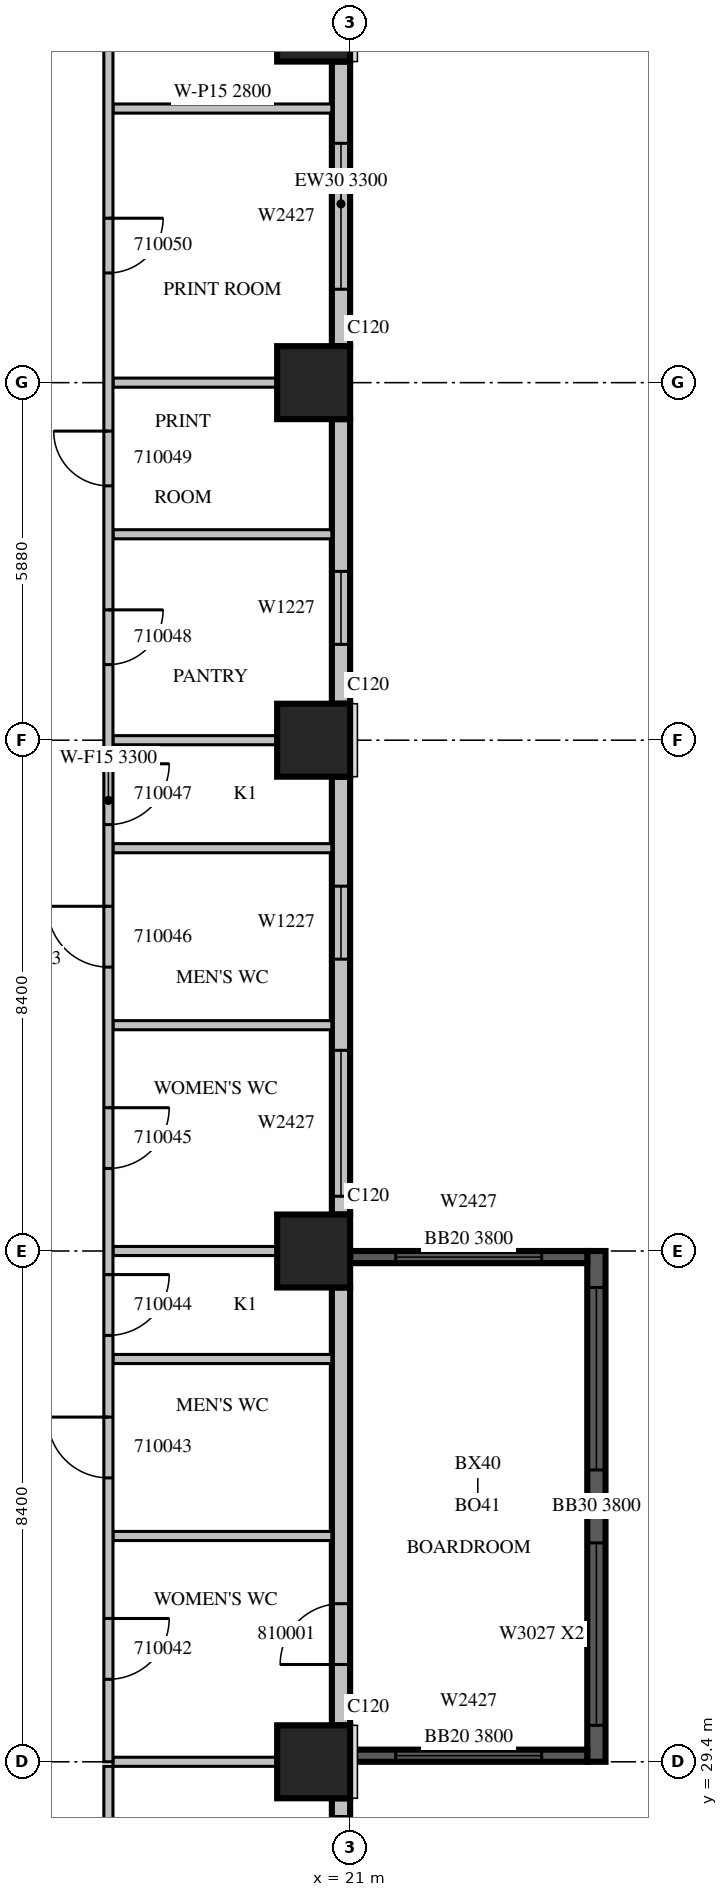
"""IFC4 building model, lengths in metres.
Left out: names, types, materials, properties, quantities, classifications, styles, units other than length and angle.
Written with IfcOpenShell. Run it as: python <this file> out.ifc"""

import sys

from ifc_helpers import new_model, si_unit, direction, frame, frame_2d, origin, origin_2d, place, context, subcontext, project, spatial, rectangle, extrude, source, transform, mapped, element, fill, save


model = new_model("IFC4")
c1 = context("Model", 3, precision=1e-05, world=origin(), true_north=direction((0.0, 1.0)))
c2 = subcontext(c1, "Body", "Model", "MODEL_VIEW")
j1 = project(units=[si_unit("LENGTHUNIT", "METRE"), si_unit("PLANEANGLEUNIT", "RADIAN")], contexts=[c1])
p1 = place(None, origin())
s1 = spatial("IfcSite", under=j1, at=p1, CompositionType="ELEMENT")
p2 = place(p1, origin())
s2 = spatial("IfcBuilding", under=s1, at=p2, CompositionType="ELEMENT")
p3 = place(p2, frame((0.0, 0.0, 53.1)))
s3 = spatial("IfcBuildingStorey", under=s2, at=p3, CompositionType="ELEMENT", Elevation=53.1)
m1 = source(origin(), c2, "Body", "SweptSolid", [
    extrude(rectangle(XDim=1.2, YDim=1.2, at=origin_2d()), origin(), (0.0, 0.0, 1.0), 4.2),
])
for number, where, z_axis, x_axis in (
    (1, (20.4, 29.4, 0.0), (0.0, 0.0, 1.0), (1.0, 0.0, 0.0)),
    (2, (20.4, 37.8, 0.0), (0.0, 0.0, 1.0), (1.0, 0.0, 0.0)),
    (3, (20.4, 46.2, 0.0), (0.0, 0.0, 1.0), (1.0, 0.0, 0.0)),
    (4, (20.4, 52.08, 0.0), (0.0, 0.0, 1.0), (1.0, 0.0, 0.0)),
    (5, (20.4, 57.96, 0.0), (0.0, 0.0, 1.0), (1.0, 0.0, 0.0)),
):
    element("IfcColumn", number, at=place(p3, frame(where, z_axis=z_axis, x_axis=x_axis)), inside=s3, PredefinedType="COLUMN", context=c2, shape_type="MappedRepresentation", body=[
        mapped(m1, transform((0.0, 0.0, 0.0), scale=1.0)),
    ])
p4 = place(p3, frame((25.05, 29.4, 0.0), z_axis=(0.0, 0.0, 1.0), x_axis=(0.0, 1.0, 0.0)))
e6 = element("IfcWall", 6, at=p4, inside=s3, PredefinedType="SOLIDWALL", context=c2, shape_type="SweptSolid", body=[
    extrude(rectangle(XDim=8.4, YDim=0.3, at=frame_2d((4.2, 0.0))), origin(), (0.0, 0.0, 1.0), 3.8),
])
m2 = source(origin(), c2, "Body", "SweptSolid", [
    extrude(rectangle(XDim=3.0, YDim=2.7, at=frame_2d((1.5, 1.35))), frame((0.0, 0.16, 0.0), z_axis=(0.0, -1.0, 0.0), x_axis=(1.0, 0.0, 0.0)), (0.0, 0.0, 1.0), 0.32),
])
p5 = place(p4, frame((0.6, 0.0, 0.6)))
e7 = element("IfcOpeningElement", 7, at=p5, cuts=e6, PredefinedType="OPENING", context=c2, shape_type="MappedRepresentation", body=[
    mapped(m2, transform((0.0, 0.0, 0.0), scale=1.0)),
])
p6 = place(p4, frame((4.8, 0.0, 0.6)))
e8 = element("IfcOpeningElement", 8, at=p6, cuts=e6, PredefinedType="OPENING", context=c2, shape_type="MappedRepresentation", body=[
    mapped(m2, transform((0.0, 0.0, 0.0), scale=1.0)),
])
m3 = source(origin(), c2, "Body", "SweptSolid", [
    extrude(rectangle(XDim=3.9, YDim=0.2, at=frame_2d((1.95, 0.0))), origin(), (0.0, 0.0, 1.0), 3.8),
])
p7 = place(p3, frame((21.0, 29.5, 0.0), z_axis=(0.0, 0.0, 1.0), x_axis=(1.0, 0.0, 0.0)))
e9 = element("IfcWall", 9, at=p7, inside=s3, PredefinedType="SOLIDWALL", context=c2, shape_type="MappedRepresentation", body=[
    mapped(m3, transform((0.0, 0.0, 0.0), scale=1.0)),
])
m4 = source(origin(), c2, "Body", "SweptSolid", [
    extrude(rectangle(XDim=2.4, YDim=2.7, at=frame_2d((1.2, 1.35))), frame((0.0, 0.11, 0.0), z_axis=(0.0, -1.0, 0.0), x_axis=(1.0, 0.0, 0.0)), (0.0, 0.0, 1.0), 0.22),
])
p8 = place(p7, frame((0.75, 0.0, 0.6)))
e10 = element("IfcOpeningElement", 10, at=p8, cuts=e9, PredefinedType="OPENING", context=c2, shape_type="MappedRepresentation", body=[
    mapped(m4, transform((0.0, 0.0, 0.0), scale=1.0)),
])
p9 = place(p3, frame((21.0, 37.7, 0.0), z_axis=(0.0, 0.0, 1.0), x_axis=(1.0, 0.0, 0.0)))
e11 = element("IfcWall", 11, at=p9, inside=s3, PredefinedType="SOLIDWALL", context=c2, shape_type="MappedRepresentation", body=[
    mapped(m3, transform((0.0, 0.0, 0.0), scale=1.0)),
])
p10 = place(p9, frame((0.75, 0.0, 0.6)))
e12 = element("IfcOpeningElement", 12, at=p10, cuts=e11, PredefinedType="OPENING", context=c2, shape_type="MappedRepresentation", body=[
    mapped(m4, transform((0.0, 0.0, 0.0), scale=1.0)),
])
m5 = source(origin(), c2, "Body", "SweptSolid", [
    extrude(rectangle(XDim=6.6, YDim=0.3, at=frame_2d((3.3, 0.0))), origin(), (0.0, 0.0, 1.0), 3.8),
])
p11 = place(p3, frame((20.85, 22.2, 0.0), z_axis=(0.0, 0.0, 1.0), x_axis=(0.0, 1.0, 0.0)))
e13 = element("IfcWall", 13, at=p11, inside=s3, PredefinedType="STANDARD", context=c2, shape_type="MappedRepresentation", body=[
    mapped(m5, transform((0.0, 0.0, 0.0), scale=1.0)),
])
m6 = source(origin(), c2, "Body", "SweptSolid", [
    extrude(rectangle(XDim=1.2, YDim=2.7, at=frame_2d((0.6, 1.35))), frame((0.0, 0.16, 0.0), z_axis=(0.0, -1.0, 0.0), x_axis=(1.0, 0.0, 0.0)), (0.0, 0.0, 1.0), 0.32),
])
p12 = place(p11, frame((0.3, 0.0, 0.6)))
e14 = element("IfcOpeningElement", 14, at=p12, cuts=e13, PredefinedType="OPENING", context=c2, shape_type="MappedRepresentation", body=[
    mapped(m6, transform((0.0, 0.0, 0.0), scale=1.0)),
])
m7 = source(origin(), c2, "Body", "SweptSolid", [
    extrude(rectangle(XDim=2.4, YDim=2.7, at=frame_2d((1.2, 1.35))), frame((0.0, 0.16, 0.0), z_axis=(0.0, -1.0, 0.0), x_axis=(1.0, 0.0, 0.0)), (0.0, 0.0, 1.0), 0.32),
])
p13 = place(p11, frame((3.9, 0.0, 0.6)))
e15 = element("IfcOpeningElement", 15, at=p13, cuts=e13, PredefinedType="OPENING", context=c2, shape_type="MappedRepresentation", body=[
    mapped(m7, transform((0.0, 0.0, 0.0), scale=1.0)),
])
m8 = source(origin(), c2, "Body", "SweptSolid", [
    extrude(rectangle(XDim=7.2, YDim=0.3, at=frame_2d((3.6, 0.0))), origin(), (0.0, 0.0, 1.0), 3.8),
])
p14 = place(p3, frame((20.85, 30.0, 0.0), z_axis=(0.0, 0.0, 1.0), x_axis=(0.0, 1.0, 0.0)))
e16 = element("IfcWall", 16, at=p14, inside=s3, PredefinedType="STANDARD", context=c2, shape_type="MappedRepresentation", body=[
    mapped(m8, transform((0.0, 0.0, 0.0), scale=1.0)),
])
m9 = source(origin(), c2, "Body", "SweptSolid", [
    extrude(rectangle(XDim=1.0, YDim=2.1, at=frame_2d((0.5, 1.05))), frame((0.0, 0.16, 0.0), z_axis=(0.0, -1.0, 0.0), x_axis=(1.0, 0.0, 0.0)), (0.0, 0.0, 1.0), 0.32),
])
p15 = place(p14, frame((1.0, 0.0, 0.0)))
e17 = element("IfcOpeningElement", 17, at=p15, cuts=e16, PredefinedType="OPENING", context=c2, shape_type="MappedRepresentation", body=[
    mapped(m9, transform((0.0, 0.0, 0.0), scale=1.0)),
])
p16 = place(p3, frame((20.85, 38.4, 0.0), z_axis=(0.0, 0.0, 1.0), x_axis=(0.0, 1.0, 0.0)))
e18 = element("IfcWall", 18, at=p16, inside=s3, PredefinedType="STANDARD", context=c2, shape_type="MappedRepresentation", body=[
    mapped(m8, transform((0.0, 0.0, 0.0), scale=1.0)),
])
p17 = place(p16, frame((0.3, 0.0, 0.6)))
e19 = element("IfcOpeningElement", 19, at=p17, cuts=e18, PredefinedType="OPENING", context=c2, shape_type="MappedRepresentation", body=[
    mapped(m7, transform((0.0, 0.0, 0.0), scale=1.0)),
])
p18 = place(p16, frame((4.199, 0.0, 0.6)))
e20 = element("IfcOpeningElement", 20, at=p18, cuts=e18, PredefinedType="OPENING", context=c2, shape_type="MappedRepresentation", body=[
    mapped(m6, transform((0.0, 0.0, 0.0), scale=1.0)),
])
m10 = source(origin(), c2, "Body", "SweptSolid", [
    extrude(rectangle(XDim=4.68, YDim=0.3, at=frame_2d((2.34, 0.0))), origin(), (0.0, 0.0, 1.0), 3.8),
])
p19 = place(p3, frame((20.85, 46.8, 0.0), z_axis=(0.0, 0.0, 1.0), x_axis=(0.0, 1.0, 0.0)))
e21 = element("IfcWall", 21, at=p19, inside=s3, PredefinedType="STANDARD", context=c2, shape_type="MappedRepresentation", body=[
    mapped(m10, transform((0.0, 0.0, 0.0), scale=1.0)),
])
p20 = place(p19, frame((0.976, 0.0, 0.6)))
e22 = element("IfcOpeningElement", 22, at=p20, cuts=e21, PredefinedType="OPENING", context=c2, shape_type="MappedRepresentation", body=[
    mapped(m6, transform((0.0, 0.0, 0.0), scale=1.0)),
])
m11 = source(origin(), c2, "Body", "SweptSolid", [
    extrude(rectangle(XDim=4.68, YDim=0.3, at=frame_2d((2.34, 0.0))), origin(), (0.0, 0.0, 1.0), 3.3),
])
p21 = place(p3, frame((20.85, 52.68, 0.0), z_axis=(0.0, 0.0, 1.0), x_axis=(0.0, 1.0, 0.0)))
e23 = element("IfcWall", 23, at=p21, inside=s3, PredefinedType="STANDARD", context=c2, shape_type="MappedRepresentation", body=[
    mapped(m11, transform((0.0, 0.0, 0.0), scale=1.0)),
])
p22 = place(p21, frame((0.936, 0.0, 0.6)))
e24 = element("IfcOpeningElement", 24, at=p22, cuts=e23, PredefinedType="OPENING", context=c2, shape_type="MappedRepresentation", body=[
    mapped(m7, transform((0.0, 0.0, 0.0), scale=1.0)),
])
m12 = source(origin(), c2, "Body", "SweptSolid", [
    extrude(rectangle(XDim=5.15, YDim=0.15, at=frame_2d((2.575, 0.0))), origin(), (0.0, 0.0, 1.0), 3.8),
])
p23 = place(p3, frame((17.025, 29.325, 0.0), z_axis=(0.0, 0.0, 1.0), x_axis=(0.0, -1.0, 0.0)))
e25 = element("IfcWall", 25, at=p23, inside=s3, PredefinedType="PARTITIONING", context=c2, shape_type="MappedRepresentation", body=[
    mapped(m12, transform((0.0, 0.0, 0.0), scale=1.0)),
])
m13 = source(origin(), c2, "Body", "SweptSolid", [
    extrude(rectangle(XDim=2.701, YDim=0.15, at=frame_2d((1.351, 0.0))), origin(), (0.0, 0.0, 1.0), 3.8),
])
p24 = place(p3, frame((19.801, 29.4, 0.0), z_axis=(0.0, 0.0, 1.0), x_axis=(-1.0, 0.0, 0.0)))
e26 = element("IfcWall", 26, at=p24, inside=s3, PredefinedType="PARTITIONING", context=c2, shape_type="MappedRepresentation", body=[
    mapped(m13, transform((0.0, 0.0, 0.0), scale=1.0)),
])
m14 = source(origin(), c2, "Body", "SweptSolid", [
    extrude(rectangle(XDim=3.6, YDim=0.15, at=frame_2d((1.8, 0.0))), origin(), (0.0, 0.0, 1.0), 3.8),
])
for number, where, z_axis, x_axis in (
    (27, (17.1, 33.113, 0.0), (0.0, 0.0, 1.0), (1.0, 0.0, 0.0)),
    (28, (17.1, 36.024, 0.0), (0.0, 0.0, 1.0), (1.0, 0.0, 0.0)),
    (29, (17.1, 41.513, 0.0), (0.0, 0.0, 1.0), (1.0, 0.0, 0.0)),
    (30, (17.1, 44.424, 0.0), (0.0, 0.0, 1.0), (1.0, 0.0, 0.0)),
    (31, (17.1, 49.587, 0.0), (0.0, 0.0, 1.0), (1.0, 0.0, 0.0)),
):
    element("IfcWall", number, at=place(p3, frame(where, z_axis=z_axis, x_axis=x_axis)), inside=s3, PredefinedType="PARTITIONING", context=c2, shape_type="MappedRepresentation", body=[
        mapped(m14, transform((0.0, 0.0, 0.0), scale=1.0)),
    ])
m15 = source(origin(), c2, "Body", "SweptSolid", [
    extrude(rectangle(XDim=3.6, YDim=0.15, at=frame_2d((1.8, 0.0))), origin(), (0.0, 0.0, 1.0), 2.8),
])
p25 = place(p3, frame((17.1, 56.587, 0.0), z_axis=(0.0, 0.0, 1.0), x_axis=(1.0, 0.0, 0.0)))
e32 = element("IfcWall", 32, at=p25, inside=s3, PredefinedType="PARTITIONING", context=c2, shape_type="MappedRepresentation", body=[
    mapped(m15, transform((0.0, 0.0, 0.0), scale=1.0)),
])
for number, where, z_axis, x_axis in (
    (33, (19.801, 37.8, 0.0), (0.0, 0.0, 1.0), (-1.0, 0.0, 0.0)),
    (34, (19.801, 46.2, 0.0), (0.0, 0.0, 1.0), (-1.0, 0.0, 0.0)),
    (35, (19.801, 52.08, 0.0), (0.0, 0.0, 1.0), (-1.0, 0.0, 0.0)),
):
    element("IfcWall", number, at=place(p3, frame(where, z_axis=z_axis, x_axis=x_axis)), inside=s3, PredefinedType="PARTITIONING", context=c2, shape_type="MappedRepresentation", body=[
        mapped(m13, transform((0.0, 0.0, 0.0), scale=1.0)),
    ])
m16 = source(origin(), c2, "Body", "SweptSolid", [
    extrude(rectangle(XDim=31.62, YDim=0.15, at=frame_2d((15.81, 0.0))), origin(), (0.0, 0.0, 1.0), 3.3),
])
p26 = place(p3, frame((17.025, 61.02, 0.0), z_axis=(0.0, 0.0, 1.0), x_axis=(0.0, -1.0, 0.0)))
e36 = element("IfcWall", 36, at=p26, inside=s3, PredefinedType="PARTITIONING", context=c2, shape_type="MappedRepresentation", body=[
    mapped(m16, transform((0.0, 0.0, 0.0), scale=1.0)),
])
m17 = source(origin(), c2, "Body", "SweptSolid", [
    extrude(rectangle(XDim=1.0, YDim=2.1, at=frame_2d((0.5, 1.05))), frame((0.0, 0.085, 0.0), z_axis=(0.0, -1.0, 0.0), x_axis=(1.0, 0.0, 0.0)), (0.0, 0.0, 1.0), 0.17),
])
p27 = place(p26, frame((29.263, 0.0, 0.0)))
e37 = element("IfcOpeningElement", 37, at=p27, cuts=e36, PredefinedType="OPENING", context=c2, shape_type="MappedRepresentation", body=[
    mapped(m17, transform((0.0, 0.0, 0.0), scale=1.0)),
])
p28 = place(p26, frame((25.951, 0.0, 0.0)))
e38 = element("IfcOpeningElement", 38, at=p28, cuts=e36, PredefinedType="OPENING", context=c2, shape_type="MappedRepresentation", body=[
    mapped(m17, transform((0.0, 0.0, 0.0), scale=1.0)),
])
p29 = place(p26, frame((23.608, 0.0, 0.0)))
e39 = element("IfcOpeningElement", 39, at=p29, cuts=e36, PredefinedType="OPENING", context=c2, shape_type="MappedRepresentation", body=[
    mapped(m17, transform((0.0, 0.0, 0.0), scale=1.0)),
])
p30 = place(p26, frame((20.863, 0.0, 0.0)))
e40 = element("IfcOpeningElement", 40, at=p30, cuts=e36, PredefinedType="OPENING", context=c2, shape_type="MappedRepresentation", body=[
    mapped(m17, transform((0.0, 0.0, 0.0), scale=1.0)),
])
p31 = place(p26, frame((17.551, 0.0, 0.0)))
e41 = element("IfcOpeningElement", 41, at=p31, cuts=e36, PredefinedType="OPENING", context=c2, shape_type="MappedRepresentation", body=[
    mapped(m17, transform((0.0, 0.0, 0.0), scale=1.0)),
])
p32 = place(p26, frame((15.208, 0.0, 0.0)))
e42 = element("IfcOpeningElement", 42, at=p32, cuts=e36, PredefinedType="OPENING", context=c2, shape_type="MappedRepresentation", body=[
    mapped(m17, transform((0.0, 0.0, 0.0), scale=1.0)),
])
m18 = source(origin(), c2, "Body", "SweptSolid", [
    extrude(rectangle(XDim=0.9, YDim=2.1, at=frame_2d((0.45, 1.05))), frame((0.0, 0.085, 0.0), z_axis=(0.0, -1.0, 0.0), x_axis=(1.0, 0.0, 0.0)), (0.0, 0.0, 1.0), 0.17),
])
p33 = place(p26, frame((12.677, 0.0, 0.0)))
e43 = element("IfcOpeningElement", 43, at=p33, cuts=e36, PredefinedType="OPENING", context=c2, shape_type="MappedRepresentation", body=[
    mapped(m18, transform((0.0, 0.0, 0.0), scale=1.0)),
])
p34 = place(p26, frame((9.737, 0.0, 0.0)))
e44 = element("IfcOpeningElement", 44, at=p34, cuts=e36, PredefinedType="OPENING", context=c2, shape_type="MappedRepresentation", body=[
    mapped(m18, transform((0.0, 0.0, 0.0), scale=1.0)),
])
p35 = place(p26, frame((6.236, 0.0, 0.0)))
e45 = element("IfcOpeningElement", 45, at=p35, cuts=e36, PredefinedType="OPENING", context=c2, shape_type="MappedRepresentation", body=[
    mapped(m18, transform((0.0, 0.0, 0.0), scale=1.0)),
])
p36 = place(p26, frame((1.729, 0.0, 0.0)))
e46 = element("IfcOpeningElement", 46, at=p36, cuts=e36, PredefinedType="OPENING", context=c2, shape_type="MappedRepresentation", body=[
    mapped(m18, transform((0.0, 0.0, 0.0), scale=1.0)),
])
m19 = source(origin(), c2, "Body", "SweptSolid", [
    extrude(rectangle(XDim=3.0, YDim=2.7, at=frame_2d((1.5, 1.35))), frame((0.0, 0.03, 0.0), z_axis=(0.0, -1.0, 0.0), x_axis=(1.0, 0.0, 0.0)), (0.0, 0.0, 1.0), 0.06),
])
p37 = place(p5, origin())
e47 = element("IfcWindow", 47, at=p37, inside=s3, PartitioningType="SINGLE_PANEL", PredefinedType="WINDOW", context=c2, shape_type="MappedRepresentation", body=[
    mapped(m19, transform((0.0, 0.0, 0.0), scale=1.0)),
])
fill(e7, e47)
p38 = place(p6, origin())
e48 = element("IfcWindow", 48, at=p38, inside=s3, PartitioningType="SINGLE_PANEL", PredefinedType="WINDOW", context=c2, shape_type="MappedRepresentation", body=[
    mapped(m19, transform((0.0, 0.0, 0.0), scale=1.0)),
])
fill(e8, e48)
m20 = source(origin(), c2, "Body", "SweptSolid", [
    extrude(rectangle(XDim=2.4, YDim=2.7, at=frame_2d((1.2, 1.35))), frame((0.0, 0.03, 0.0), z_axis=(0.0, -1.0, 0.0), x_axis=(1.0, 0.0, 0.0)), (0.0, 0.0, 1.0), 0.06),
])
p39 = place(p8, origin())
e49 = element("IfcWindow", 49, at=p39, inside=s3, PartitioningType="SINGLE_PANEL", PredefinedType="WINDOW", context=c2, shape_type="MappedRepresentation", body=[
    mapped(m20, transform((0.0, 0.0, 0.0), scale=1.0)),
])
fill(e10, e49)
p40 = place(p10, origin())
e50 = element("IfcWindow", 50, at=p40, inside=s3, PartitioningType="SINGLE_PANEL", PredefinedType="WINDOW", context=c2, shape_type="MappedRepresentation", body=[
    mapped(m20, transform((0.0, 0.0, 0.0), scale=1.0)),
])
fill(e12, e50)
p41 = place(p13, origin())
e51 = element("IfcWindow", 51, at=p41, inside=s3, PartitioningType="SINGLE_PANEL", PredefinedType="WINDOW", context=c2, shape_type="MappedRepresentation", body=[
    mapped(m20, transform((0.0, 0.0, 0.0), scale=1.0)),
])
fill(e15, e51)
p42 = place(p17, origin())
e52 = element("IfcWindow", 52, at=p42, inside=s3, PartitioningType="SINGLE_PANEL", PredefinedType="WINDOW", context=c2, shape_type="MappedRepresentation", body=[
    mapped(m20, transform((0.0, 0.0, 0.0), scale=1.0)),
])
fill(e19, e52)
m21 = source(origin(), c2, "Body", "SweptSolid", [
    extrude(rectangle(XDim=1.2, YDim=2.7, at=frame_2d((0.6, 1.35))), frame((0.0, 0.03, 0.0), z_axis=(0.0, -1.0, 0.0), x_axis=(1.0, 0.0, 0.0)), (0.0, 0.0, 1.0), 0.06),
])
p43 = place(p18, origin())
e53 = element("IfcWindow", 53, at=p43, inside=s3, PartitioningType="SINGLE_PANEL", PredefinedType="WINDOW", context=c2, shape_type="MappedRepresentation", body=[
    mapped(m21, transform((0.0, 0.0, 0.0), scale=1.0)),
])
fill(e20, e53)
p44 = place(p20, origin())
e54 = element("IfcWindow", 54, at=p44, inside=s3, PartitioningType="SINGLE_PANEL", PredefinedType="WINDOW", context=c2, shape_type="MappedRepresentation", body=[
    mapped(m21, transform((0.0, 0.0, 0.0), scale=1.0)),
])
fill(e22, e54)
p45 = place(p22, origin())
e55 = element("IfcWindow", 55, at=p45, inside=s3, PartitioningType="SINGLE_PANEL", PredefinedType="WINDOW", context=c2, shape_type="MappedRepresentation", body=[
    mapped(m20, transform((0.0, 0.0, 0.0), scale=1.0)),
])
fill(e24, e55)
m22 = source(origin(), c2, "Body", "SweptSolid", [
    extrude(rectangle(XDim=1.0, YDim=2.1, at=frame_2d((0.5, 1.05))), frame((0.0, 0.025, 0.0), z_axis=(0.0, -1.0, 0.0), x_axis=(1.0, 0.0, 0.0)), (0.0, 0.0, 1.0), 0.05),
])
p46 = place(p27, origin())
e56 = element("IfcDoor", 56, at=p46, inside=s3, OperationType="SINGLE_SWING_LEFT", PredefinedType="DOOR", context=c2, shape_type="MappedRepresentation", body=[
    mapped(m22, transform((0.0, 0.0, 0.0), scale=1.0)),
])
fill(e37, e56)
p47 = place(p28, origin())
e57 = element("IfcDoor", 57, at=p47, inside=s3, OperationType="SINGLE_SWING_RIGHT", PredefinedType="DOOR", context=c2, shape_type="MappedRepresentation", body=[
    mapped(m22, transform((0.0, 0.0, 0.0), scale=1.0)),
])
fill(e38, e57)
p48 = place(p29, origin())
e58 = element("IfcDoor", 58, at=p48, inside=s3, OperationType="SINGLE_SWING_LEFT", PredefinedType="DOOR", context=c2, shape_type="MappedRepresentation", body=[
    mapped(m22, transform((0.0, 0.0, 0.0), scale=1.0)),
])
fill(e39, e58)
p49 = place(p30, origin())
e59 = element("IfcDoor", 59, at=p49, inside=s3, OperationType="SINGLE_SWING_LEFT", PredefinedType="DOOR", context=c2, shape_type="MappedRepresentation", body=[
    mapped(m22, transform((0.0, 0.0, 0.0), scale=1.0)),
])
fill(e40, e59)
p50 = place(p31, origin())
e60 = element("IfcDoor", 60, at=p50, inside=s3, OperationType="SINGLE_SWING_RIGHT", PredefinedType="DOOR", context=c2, shape_type="MappedRepresentation", body=[
    mapped(m22, transform((0.0, 0.0, 0.0), scale=1.0)),
])
fill(e41, e60)
p51 = place(p32, origin())
e61 = element("IfcDoor", 61, at=p51, inside=s3, OperationType="SINGLE_SWING_LEFT", PredefinedType="DOOR", context=c2, shape_type="MappedRepresentation", body=[
    mapped(m22, transform((0.0, 0.0, 0.0), scale=1.0)),
])
fill(e42, e61)
m23 = source(origin(), c2, "Body", "SweptSolid", [
    extrude(rectangle(XDim=0.9, YDim=2.1, at=frame_2d((0.45, 1.05))), frame((0.0, 0.025, 0.0), z_axis=(0.0, -1.0, 0.0), x_axis=(1.0, 0.0, 0.0)), (0.0, 0.0, 1.0), 0.05),
])
p52 = place(p33, origin())
e62 = element("IfcDoor", 62, at=p52, inside=s3, OperationType="SINGLE_SWING_LEFT", PredefinedType="DOOR", context=c2, shape_type="MappedRepresentation", body=[
    mapped(m23, transform((0.0, 0.0, 0.0), scale=1.0)),
])
fill(e43, e62)
p53 = place(p34, origin())
e63 = element("IfcDoor", 63, at=p53, inside=s3, OperationType="SINGLE_SWING_RIGHT", PredefinedType="DOOR", context=c2, shape_type="MappedRepresentation", body=[
    mapped(m23, transform((0.0, 0.0, 0.0), scale=1.0)),
])
fill(e44, e63)
p54 = place(p35, origin())
e64 = element("IfcDoor", 64, at=p54, inside=s3, OperationType="SINGLE_SWING_LEFT", PredefinedType="DOOR", context=c2, shape_type="MappedRepresentation", body=[
    mapped(m23, transform((0.0, 0.0, 0.0), scale=1.0)),
])
fill(e45, e64)
p55 = place(p15, origin())
e65 = element("IfcDoor", 65, at=p55, inside=s3, OperationType="SINGLE_SWING_LEFT", PredefinedType="DOOR", context=c2, shape_type="MappedRepresentation", body=[
    mapped(m22, transform((0.0, 0.0, 0.0), scale=1.0)),
])
fill(e17, e65)
save(model, sys.argv[1])
